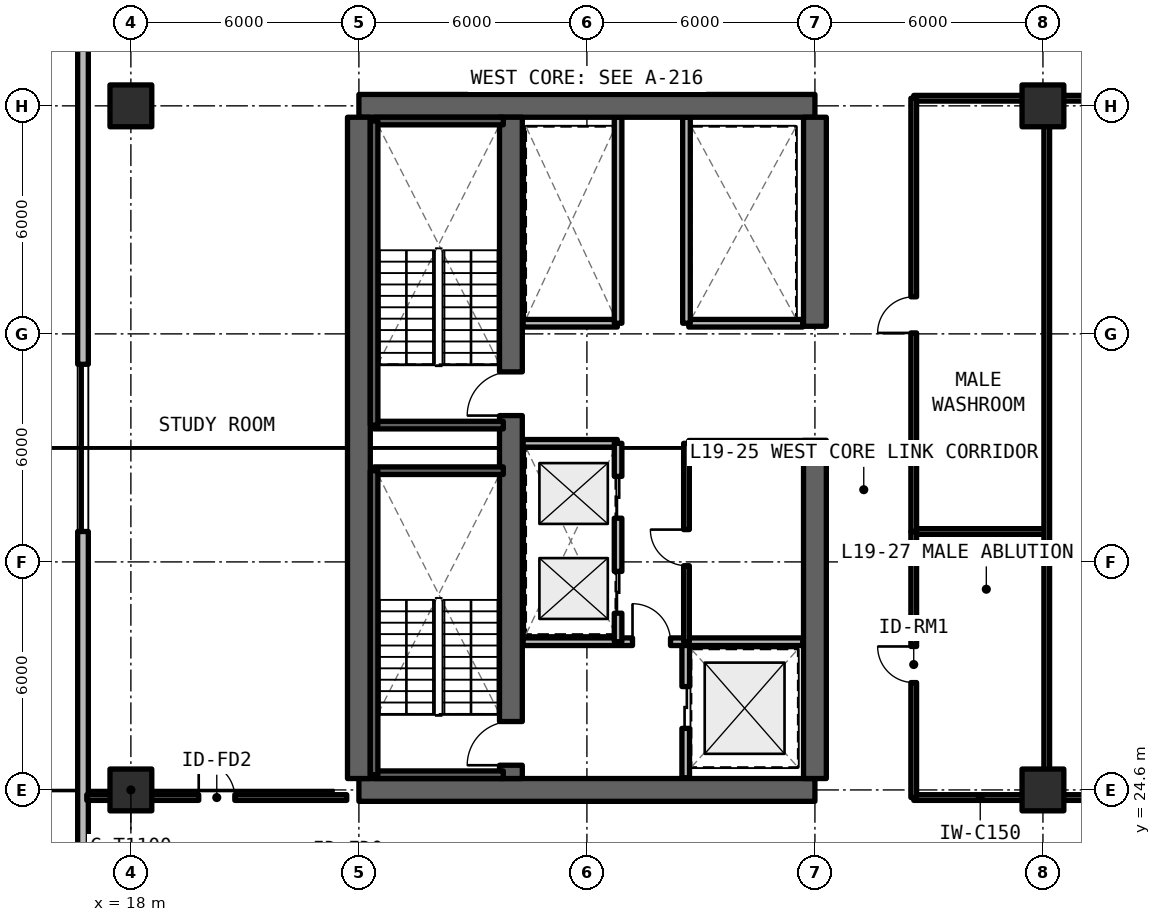
"""IFC4 building model, lengths in metres.
Left out: names, types, materials, properties, quantities, classifications, styles, units other than length and angle.
Written with IfcOpenShell. Run it as: python <this file> out.ifc"""

import sys

from ifc_helpers import new_model, si_unit, direction, frame, frame_2d, origin, origin_2d, place, context, subcontext, project, spatial, rectangle, extrude, element, fill, save


model = new_model("IFC4")
c1 = context("Model", 3, precision=1e-05, world=origin(), true_north=direction((0.0, 1.0)))
c2 = subcontext(c1, "Body", "Model", "MODEL_VIEW")
j1 = project(units=[si_unit("LENGTHUNIT", "METRE"), si_unit("PLANEANGLEUNIT", "RADIAN")], contexts=[c1])
p1 = place(None, origin())
s1 = spatial("IfcSite", under=j1, at=p1, CompositionType="ELEMENT")
p2 = place(p1, origin())
s2 = spatial("IfcBuilding", under=s1, at=p2, CompositionType="ELEMENT")
p3 = place(p2, frame((0.0, 0.0, 69.63)))
s3 = spatial("IfcBuildingStorey", under=s2, at=p3, CompositionType="ELEMENT", Elevation=69.63)
for number, where, z_axis, x_axis in (
    (1, (24.0, 24.6, 0.0), (0.0, 0.0, 1.0), (1.0, 0.0, 0.0)),
    (2, (36.0, 42.6, 0.0), (0.0, 0.0, 1.0), (-1.0, 0.0, 0.0)),
):
    element("IfcWall", number, at=place(p3, frame(where, z_axis=z_axis, x_axis=x_axis)), inside=s3, PredefinedType="SHEAR", context=c2, shape_type="SweptSolid", body=[
        extrude(rectangle(XDim=12.0, YDim=0.6, at=frame_2d((6.0, 0.0))), origin(), (0.0, 0.0, 1.0), 3.63),
    ])
p4 = place(p3, frame((24.0, 24.9, 0.0), z_axis=(0.0, 0.0, 1.0), x_axis=(0.0, 1.0, 0.0)))
e3 = element("IfcWall", 3, at=p4, inside=s3, PredefinedType="SHEAR", context=c2, shape_type="SweptSolid", body=[
    extrude(rectangle(XDim=17.4, YDim=0.6, at=frame_2d((8.7, 0.0))), origin(), (0.0, 0.0, 1.0), 3.63),
])
p5 = place(p3, frame((36.0, 24.9, 0.0), z_axis=(0.0, 0.0, 1.0), x_axis=(0.0, 1.0, 0.0)))
e4 = element("IfcWall", 4, at=p5, inside=s3, PredefinedType="SHEAR", context=c2, shape_type="SweptSolid", body=[
    extrude(rectangle(XDim=8.9, YDim=0.6, at=frame_2d((4.45, 0.0))), origin(), (0.0, 0.0, 1.0), 3.63),
])
p6 = place(p3, frame((36.0, 36.8, 0.0), z_axis=(0.0, 0.0, 1.0), x_axis=(0.0, 1.0, 0.0)))
e5 = element("IfcWall", 5, at=p6, inside=s3, PredefinedType="SHEAR", context=c2, shape_type="SweptSolid", body=[
    extrude(rectangle(XDim=5.5, YDim=0.6, at=frame_2d((2.75, 0.0))), origin(), (0.0, 0.0, 1.0), 3.63),
])
p7 = place(p3, frame((28.0, 24.9, 0.0), z_axis=(0.0, 0.0, 1.0), x_axis=(0.0, 1.0, 0.0)))
e6 = element("IfcWall", 6, at=p7, inside=s3, PredefinedType="SHEAR", context=c2, shape_type="SweptSolid", body=[
    extrude(rectangle(XDim=17.4, YDim=0.6, at=frame_2d((8.7, 0.0))), origin(), (0.0, 0.0, 1.0), 3.63),
])
p8 = place(p7, frame((0.35, 0.0, 0.0)))
e7 = element("IfcOpeningElement", 7, at=p8, cuts=e6, PredefinedType="OPENING", context=c2, shape_type="SweptSolid", body=[
    extrude(rectangle(XDim=1.15, YDim=2.15, at=frame_2d((0.575, 1.075))), frame((0.0, 0.31, 0.0), z_axis=(0.0, -1.0, 0.0), x_axis=(1.0, 0.0, 0.0)), (0.0, 0.0, 1.0), 0.62),
])
p9 = place(p7, frame((9.55, 0.0, 0.0)))
e8 = element("IfcOpeningElement", 8, at=p9, cuts=e6, PredefinedType="OPENING", context=c2, shape_type="SweptSolid", body=[
    extrude(rectangle(XDim=1.15, YDim=2.15, at=frame_2d((0.575, 1.075))), frame((0.0, 0.31, 0.0), z_axis=(0.0, -1.0, 0.0), x_axis=(1.0, 0.0, 0.0)), (0.0, 0.0, 1.0), 0.62),
])
for number, where, z_axis, x_axis in (
    (9, (18.0, 24.6, 0.0), (0.0, 0.0, 1.0), (1.0, 0.0, 0.0)),
    (10, (18.0, 42.6, 0.0), (0.0, 0.0, 1.0), (1.0, 0.0, 0.0)),
    (11, (42.0, 24.6, 0.0), (0.0, 0.0, 1.0), (1.0, 0.0, 0.0)),
    (12, (42.0, 42.6, 0.0), (0.0, 0.0, 1.0), (1.0, 0.0, 0.0)),
):
    element("IfcColumn", number, at=place(p3, frame(where, z_axis=z_axis, x_axis=x_axis)), inside=s3, PredefinedType="COLUMN", context=c2, shape_type="SweptSolid", body=[
        extrude(rectangle(XDim=1.1, YDim=1.1, at=origin_2d()), origin(), (0.0, 0.0, 1.0), 3.63),
    ])
p10 = place(p3, frame((16.74, 55.342, 0.0), z_axis=(0.0, 0.0, 1.0), x_axis=(0.0, -1.0, 0.0)))
e13 = element("IfcWall", 13, at=p10, inside=s3, PredefinedType="SOLIDWALL", context=c2, shape_type="SweptSolid", body=[
    extrude(rectangle(XDim=43.484, YDim=0.28, at=frame_2d((21.742, 0.0))), origin(), (0.0, 0.0, 1.0), 3.35),
])
p11 = place(p10, frame((19.542, 0.0, 0.78)))
e14 = element("IfcOpeningElement", 14, at=p11, cuts=e13, PredefinedType="OPENING", context=c2, shape_type="SweptSolid", body=[
    extrude(rectangle(XDim=4.4, YDim=1.66, at=frame_2d((2.2, 0.83))), frame((0.0, 0.15, 0.0), z_axis=(0.0, -1.0, 0.0), x_axis=(1.0, 0.0, 0.0)), (0.0, 0.0, 1.0), 0.3),
])
p12 = place(p10, frame((37.573, 0.0, 0.78)))
e15 = element("IfcOpeningElement", 15, at=p12, cuts=e13, PredefinedType="OPENING", context=c2, shape_type="SweptSolid", body=[
    extrude(rectangle(XDim=4.4, YDim=1.66, at=frame_2d((2.2, 0.83))), frame((0.0, 0.15, 0.0), z_axis=(0.0, -1.0, 0.0), x_axis=(1.0, 0.0, 0.0)), (0.0, 0.0, 1.0), 0.3),
])
p13 = place(p3, frame((32.6, 24.92, 0.0), z_axis=(0.0, 0.0, 1.0), x_axis=(0.0, 1.0, 0.0)))
e16 = element("IfcWall", 16, at=p13, inside=s3, PredefinedType="SOLIDWALL", context=c2, shape_type="SweptSolid", body=[
    extrude(rectangle(XDim=3.58, YDim=0.2, at=frame_2d((1.79, 0.0))), origin(), (0.0, 0.0, 1.0), 2.57),
])
p14 = place(p13, frame((1.3, 0.0, 0.0)))
e17 = element("IfcOpeningElement", 17, at=p14, cuts=e16, PredefinedType="OPENING", context=c2, shape_type="SweptSolid", body=[
    extrude(rectangle(XDim=1.1, YDim=2.2, at=frame_2d((0.55, 1.1))), frame((0.0, 0.11, 0.0), z_axis=(0.0, -1.0, 0.0), x_axis=(1.0, 0.0, 0.0)), (0.0, 0.0, 1.0), 0.22),
])
p15 = place(p3, frame((28.32, 28.5, 0.0), z_axis=(0.0, 0.0, 1.0), x_axis=(1.0, 0.0, 0.0)))
e18 = element("IfcWall", 18, at=p15, inside=s3, PredefinedType="SOLIDWALL", context=c2, shape_type="SweptSolid", body=[
    extrude(rectangle(XDim=7.36, YDim=0.2, at=frame_2d((3.68, 0.0))), origin(), (0.0, 0.0, 1.0), 2.57),
])
p16 = place(p15, frame((2.88, 0.0, 0.0)))
e19 = element("IfcOpeningElement", 19, at=p16, cuts=e18, PredefinedType="OPENING", context=c2, shape_type="SweptSolid", body=[
    extrude(rectangle(XDim=1.0, YDim=2.15, at=frame_2d((0.5, 1.075))), frame((0.0, 0.11, 0.0), z_axis=(0.0, -1.0, 0.0), x_axis=(1.0, 0.0, 0.0)), (0.0, 0.0, 1.0), 0.22),
])
p17 = place(p3, frame((28.32, 33.72, 0.0), z_axis=(0.0, 0.0, 1.0), x_axis=(1.0, 0.0, 0.0)))
e20 = element("IfcWall", 20, at=p17, inside=s3, PredefinedType="SOLIDWALL", context=c2, shape_type="SweptSolid", body=[
    extrude(rectangle(XDim=2.48, YDim=0.2, at=frame_2d((1.24, 0.0))), origin(), (0.0, 0.0, 1.0), 2.57),
])
p18 = place(p3, frame((30.82, 28.5, 0.0), z_axis=(0.0, 0.0, 1.0), x_axis=(0.0, 1.0, 0.0)))
e21 = element("IfcWall", 21, at=p18, inside=s3, PredefinedType="SOLIDWALL", context=c2, shape_type="SweptSolid", body=[
    extrude(rectangle(XDim=5.22, YDim=0.2, at=frame_2d((2.61, 0.0))), origin(), (0.0, 0.0, 1.0), 2.57),
])
p19 = place(p18, frame((0.75, 0.0, 0.0)))
e22 = element("IfcOpeningElement", 22, at=p19, cuts=e21, PredefinedType="OPENING", context=c2, shape_type="SweptSolid", body=[
    extrude(rectangle(XDim=1.1, YDim=2.2, at=frame_2d((0.55, 1.1))), frame((0.0, 0.11, 0.0), z_axis=(0.0, -1.0, 0.0), x_axis=(1.0, 0.0, 0.0)), (0.0, 0.0, 1.0), 0.22),
])
p20 = place(p18, frame((3.25, 0.0, 0.0)))
e23 = element("IfcOpeningElement", 23, at=p20, cuts=e21, PredefinedType="OPENING", context=c2, shape_type="SweptSolid", body=[
    extrude(rectangle(XDim=1.1, YDim=2.2, at=frame_2d((0.55, 1.1))), frame((0.0, 0.11, 0.0), z_axis=(0.0, -1.0, 0.0), x_axis=(1.0, 0.0, 0.0)), (0.0, 0.0, 1.0), 0.22),
])
p21 = place(p3, frame((32.68, 33.72, 0.0), z_axis=(0.0, 0.0, 1.0), x_axis=(1.0, 0.0, 0.0)))
e24 = element("IfcWall", 24, at=p21, inside=s3, PredefinedType="SOLIDWALL", context=c2, shape_type="SweptSolid", body=[
    extrude(rectangle(XDim=3.0, YDim=0.15, at=frame_2d((1.5, 0.0))), origin(), (0.0, 0.0, 1.0), 2.57),
])
p22 = place(p3, frame((32.62, 28.5, 0.0), z_axis=(0.0, 0.0, 1.0), x_axis=(0.0, 1.0, 0.0)))
e25 = element("IfcWall", 25, at=p22, inside=s3, PredefinedType="SOLIDWALL", context=c2, shape_type="SweptSolid", body=[
    extrude(rectangle(XDim=5.22, YDim=0.15, at=frame_2d((2.61, 0.0))), origin(), (0.0, 0.0, 1.0), 2.57),
])
p23 = place(p22, frame((2.0, 0.0, 0.0)))
e26 = element("IfcOpeningElement", 26, at=p23, cuts=e25, PredefinedType="OPENING", context=c2, shape_type="SweptSolid", body=[
    extrude(rectangle(XDim=0.95, YDim=2.15, at=frame_2d((0.475, 1.075))), frame((0.0, 0.085, 0.0), z_axis=(0.0, -1.0, 0.0), x_axis=(1.0, 0.0, 0.0)), (0.0, 0.0, 1.0), 0.17),
])
p24 = place(p3, frame((28.32, 36.88, 0.0), z_axis=(0.0, 0.0, 1.0), x_axis=(1.0, 0.0, 0.0)))
e27 = element("IfcWall", 27, at=p24, inside=s3, PredefinedType="SOLIDWALL", context=c2, shape_type="SweptSolid", body=[
    extrude(rectangle(XDim=2.48, YDim=0.2, at=frame_2d((1.24, 0.0))), origin(), (0.0, 0.0, 1.0), 2.57),
])
p25 = place(p3, frame((30.82, 36.88, 0.0), z_axis=(0.0, 0.0, 1.0), x_axis=(0.0, 1.0, 0.0)))
e28 = element("IfcWall", 28, at=p25, inside=s3, PredefinedType="SOLIDWALL", context=c2, shape_type="SweptSolid", body=[
    extrude(rectangle(XDim=5.42, YDim=0.2, at=frame_2d((2.71, 0.0))), origin(), (0.0, 0.0, 1.0), 2.57),
])
p26 = place(p3, frame((32.68, 36.88, 0.0), z_axis=(0.0, 0.0, 1.0), x_axis=(1.0, 0.0, 0.0)))
e29 = element("IfcWall", 29, at=p26, inside=s3, PredefinedType="SOLIDWALL", context=c2, shape_type="SweptSolid", body=[
    extrude(rectangle(XDim=3.0, YDim=0.2, at=frame_2d((1.5, 0.0))), origin(), (0.0, 0.0, 1.0), 2.57),
])
p27 = place(p3, frame((32.62, 36.88, 0.0), z_axis=(0.0, 0.0, 1.0), x_axis=(0.0, 1.0, 0.0)))
e30 = element("IfcWall", 30, at=p27, inside=s3, PredefinedType="SOLIDWALL", context=c2, shape_type="SweptSolid", body=[
    extrude(rectangle(XDim=5.42, YDim=0.2, at=frame_2d((2.71, 0.0))), origin(), (0.0, 0.0, 1.0), 2.57),
])
p28 = place(p3, frame((38.6, 24.4, 0.0), z_axis=(0.0, 0.0, 1.0), x_axis=(1.0, 0.0, 0.0)))
e31 = element("IfcWall", 31, at=p28, inside=s3, PredefinedType="SOLIDWALL", context=c2, shape_type="SweptSolid", body=[
    extrude(rectangle(XDim=3.5, YDim=0.15, at=frame_2d((1.75, 0.0))), origin(), (0.0, 0.0, 1.0), 2.565),
])
p29 = place(p3, frame((38.6, 31.4, 0.0), z_axis=(0.0, 0.0, 1.0), x_axis=(1.0, 0.0, 0.0)))
e32 = element("IfcWall", 32, at=p29, inside=s3, PredefinedType="SOLIDWALL", context=c2, shape_type="SweptSolid", body=[
    extrude(rectangle(XDim=3.5, YDim=0.15, at=frame_2d((1.75, 0.0))), origin(), (0.0, 0.0, 1.0), 2.57),
])
p30 = place(p3, frame((38.6, 24.4, 0.0), z_axis=(0.0, 0.0, 1.0), x_axis=(0.0, 1.0, 0.0)))
e33 = element("IfcWall", 33, at=p30, inside=s3, PredefinedType="SOLIDWALL", context=c2, shape_type="SweptSolid", body=[
    extrude(rectangle(XDim=7.0, YDim=0.15, at=frame_2d((3.5, 0.0))), origin(), (0.0, 0.0, 1.0), 2.57),
])
p31 = place(p30, frame((3.025, 0.0, 0.0)))
e34 = element("IfcOpeningElement", 34, at=p31, cuts=e33, PredefinedType="OPENING", context=c2, shape_type="SweptSolid", body=[
    extrude(rectangle(XDim=0.95, YDim=2.15, at=frame_2d((0.475, 1.075))), frame((0.0, 0.085, 0.0), z_axis=(0.0, -1.0, 0.0), x_axis=(1.0, 0.0, 0.0)), (0.0, 0.0, 1.0), 0.17),
])
p32 = place(p3, frame((38.6, 42.8, 0.0), z_axis=(0.0, 0.0, 1.0), x_axis=(1.0, 0.0, 0.0)))
e35 = element("IfcWall", 35, at=p32, inside=s3, PredefinedType="SOLIDWALL", context=c2, shape_type="SweptSolid", body=[
    extrude(rectangle(XDim=3.5, YDim=0.15, at=frame_2d((1.75, 0.0))), origin(), (0.0, 0.0, 1.0), 2.565),
])
p33 = place(p3, frame((38.6, 31.4, 0.0), z_axis=(0.0, 0.0, 1.0), x_axis=(0.0, 1.0, 0.0)))
e36 = element("IfcWall", 36, at=p33, inside=s3, PredefinedType="SOLIDWALL", context=c2, shape_type="SweptSolid", body=[
    extrude(rectangle(XDim=11.4, YDim=0.15, at=frame_2d((5.7, 0.0))), origin(), (0.0, 0.0, 1.0), 2.57),
])
p34 = place(p33, frame((5.225, 0.0, 0.0)))
e37 = element("IfcOpeningElement", 37, at=p34, cuts=e36, PredefinedType="OPENING", context=c2, shape_type="SweptSolid", body=[
    extrude(rectangle(XDim=0.95, YDim=2.15, at=frame_2d((0.475, 1.075))), frame((0.0, 0.085, 0.0), z_axis=(0.0, -1.0, 0.0), x_axis=(1.0, 0.0, 0.0)), (0.0, 0.0, 1.0), 0.17),
])
p35 = place(p3, frame((42.1, 24.4, 0.0), z_axis=(0.0, 0.0, 1.0), x_axis=(1.0, 0.0, 0.0)))
e38 = element("IfcWall", 38, at=p35, inside=s3, PredefinedType="SOLIDWALL", context=c2, shape_type="SweptSolid", body=[
    extrude(rectangle(XDim=29.0, YDim=0.15, at=frame_2d((14.5, 0.0))), origin(), (0.0, 0.0, 1.0), 2.565),
])
p36 = place(p35, frame((13.8, 0.0, 0.0)))
e39 = element("IfcOpeningElement", 39, at=p36, cuts=e38, PredefinedType="OPENING", context=c2, shape_type="SweptSolid", body=[
    extrude(rectangle(XDim=1.4, YDim=2.15, at=frame_2d((0.7, 1.075))), frame((0.0, 0.085, 0.0), z_axis=(0.0, -1.0, 0.0), x_axis=(1.0, 0.0, 0.0)), (0.0, 0.0, 1.0), 0.17),
])
p37 = place(p3, frame((42.1, 42.8, 0.0), z_axis=(0.0, 0.0, 1.0), x_axis=(1.0, 0.0, 0.0)))
e40 = element("IfcWall", 40, at=p37, inside=s3, PredefinedType="SOLIDWALL", context=c2, shape_type="SweptSolid", body=[
    extrude(rectangle(XDim=29.0, YDim=0.15, at=frame_2d((14.5, 0.0))), origin(), (0.0, 0.0, 1.0), 2.565),
])
p38 = place(p3, frame((42.1, 24.4, 0.0), z_axis=(0.0, 0.0, 1.0), x_axis=(0.0, 1.0, 0.0)))
e41 = element("IfcWall", 41, at=p38, inside=s3, PredefinedType="SOLIDWALL", context=c2, shape_type="SweptSolid", body=[
    extrude(rectangle(XDim=18.4, YDim=0.15, at=frame_2d((9.2, 0.0))), origin(), (0.0, 0.0, 1.0), 2.57),
])
p39 = place(p3, frame((16.84, 24.4, 0.0), z_axis=(0.0, 0.0, 1.0), x_axis=(1.0, 0.0, 0.0)))
e42 = element("IfcWall", 42, at=p39, inside=s3, PredefinedType="SOLIDWALL", context=c2, shape_type="SweptSolid", body=[
    extrude(rectangle(XDim=6.84, YDim=0.15, at=frame_2d((3.42, 0.0))), origin(), (0.0, 0.0, 1.0), 2.565),
])
p40 = place(p39, frame((2.945, 0.0, 0.0)))
e43 = element("IfcOpeningElement", 43, at=p40, cuts=e42, PredefinedType="OPENING", context=c2, shape_type="SweptSolid", body=[
    extrude(rectangle(XDim=0.95, YDim=2.15, at=frame_2d((0.475, 1.075))), frame((0.0, 0.085, 0.0), z_axis=(0.0, -1.0, 0.0), x_axis=(1.0, 0.0, 0.0)), (0.0, 0.0, 1.0), 0.17),
])
for number, where, z_axis, x_axis in (
    (44, (24.4, 25.0, 0.0), (0.0, 0.0, 1.0), (1.0, 0.0, 0.0)),
    (45, (27.8, 33.0, 0.0), (0.0, 0.0, 1.0), (-1.0, 0.0, 0.0)),
):
    element("IfcWall", number, at=place(p3, frame(where, z_axis=z_axis, x_axis=x_axis)), inside=s3, PredefinedType="SOLIDWALL", context=c2, shape_type="SweptSolid", body=[
        extrude(rectangle(XDim=3.4, YDim=0.2, at=frame_2d((1.7, 0.0))), origin(), (0.0, 0.0, 1.0), 3.63),
    ])
p41 = place(p3, frame((24.4, 33.0, 0.0), z_axis=(0.0, 0.0, 1.0), x_axis=(0.0, -1.0, 0.0)))
e46 = element("IfcWall", 46, at=p41, inside=s3, PredefinedType="SOLIDWALL", context=c2, shape_type="SweptSolid", body=[
    extrude(rectangle(XDim=8.0, YDim=0.2, at=frame_2d((4.0, 0.0))), origin(), (0.0, 0.0, 1.0), 3.63),
])
for number, where, z_axis, x_axis in (
    (47, (24.4, 34.2, 0.0), (0.0, 0.0, 1.0), (1.0, 0.0, 0.0)),
    (48, (27.8, 42.2, 0.0), (0.0, 0.0, 1.0), (-1.0, 0.0, 0.0)),
):
    element("IfcWall", number, at=place(p3, frame(where, z_axis=z_axis, x_axis=x_axis)), inside=s3, PredefinedType="SOLIDWALL", context=c2, shape_type="SweptSolid", body=[
        extrude(rectangle(XDim=3.4, YDim=0.2, at=frame_2d((1.7, 0.0))), origin(), (0.0, 0.0, 1.0), 3.63),
    ])
p42 = place(p3, frame((24.4, 42.2, 0.0), z_axis=(0.0, 0.0, 1.0), x_axis=(0.0, -1.0, 0.0)))
e49 = element("IfcWall", 49, at=p42, inside=s3, PredefinedType="SOLIDWALL", context=c2, shape_type="SweptSolid", body=[
    extrude(rectangle(XDim=8.0, YDim=0.2, at=frame_2d((4.0, 0.0))), origin(), (0.0, 0.0, 1.0), 3.63),
])
p43 = place(p11, origin())
e50 = element("IfcWindow", 50, at=p43, inside=s3, PartitioningType="SINGLE_PANEL", PredefinedType="WINDOW", context=c2, shape_type="SweptSolid", body=[
    extrude(rectangle(XDim=4.4, YDim=1.66, at=frame_2d((2.2, 0.83))), frame((0.0, 0.03, 0.0), z_axis=(0.0, -1.0, 0.0), x_axis=(1.0, 0.0, 0.0)), (0.0, 0.0, 1.0), 0.06),
])
fill(e14, e50)
p44 = place(p14, origin())
e51 = element("IfcDoor", 51, at=p44, inside=s3, OperationType="SLIDING_TO_LEFT", PredefinedType="DOOR", context=c2, shape_type="SweptSolid", body=[
    extrude(rectangle(XDim=1.1, YDim=2.2, at=frame_2d((0.55, 1.1))), frame((0.0, 0.025, 0.0), z_axis=(0.0, -1.0, 0.0), x_axis=(1.0, 0.0, 0.0)), (0.0, 0.0, 1.0), 0.05),
])
fill(e17, e51)
p45 = place(p16, origin())
e52 = element("IfcDoor", 52, at=p45, inside=s3, OperationType="SINGLE_SWING_LEFT", PredefinedType="DOOR", context=c2, shape_type="SweptSolid", body=[
    extrude(rectangle(XDim=1.0, YDim=2.15, at=frame_2d((0.5, 1.075))), frame((0.0, 0.025, 0.0), z_axis=(0.0, -1.0, 0.0), x_axis=(1.0, 0.0, 0.0)), (0.0, 0.0, 1.0), 0.05),
])
fill(e19, e52)
p46 = place(p19, origin())
e53 = element("IfcDoor", 53, at=p46, inside=s3, OperationType="SLIDING_TO_LEFT", PredefinedType="DOOR", context=c2, shape_type="SweptSolid", body=[
    extrude(rectangle(XDim=1.1, YDim=2.2, at=frame_2d((0.55, 1.1))), frame((0.0, 0.025, 0.0), z_axis=(0.0, -1.0, 0.0), x_axis=(1.0, 0.0, 0.0)), (0.0, 0.0, 1.0), 0.05),
])
fill(e22, e53)
p47 = place(p20, origin())
e54 = element("IfcDoor", 54, at=p47, inside=s3, OperationType="SLIDING_TO_RIGHT", PredefinedType="DOOR", context=c2, shape_type="SweptSolid", body=[
    extrude(rectangle(XDim=1.1, YDim=2.2, at=frame_2d((0.55, 1.1))), frame((0.0, 0.025, 0.0), z_axis=(0.0, -1.0, 0.0), x_axis=(1.0, 0.0, 0.0)), (0.0, 0.0, 1.0), 0.05),
])
fill(e23, e54)
p48 = place(p23, origin())
e55 = element("IfcDoor", 55, at=p48, inside=s3, OperationType="SINGLE_SWING_RIGHT", PredefinedType="DOOR", context=c2, shape_type="SweptSolid", body=[
    extrude(rectangle(XDim=0.95, YDim=2.15, at=frame_2d((0.475, 1.075))), frame((0.0, 0.025, 0.0), z_axis=(0.0, -1.0, 0.0), x_axis=(1.0, 0.0, 0.0)), (0.0, 0.0, 1.0), 0.05),
])
fill(e26, e55)
p49 = place(p31, origin())
e56 = element("IfcDoor", 56, at=p49, inside=s3, OperationType="SINGLE_SWING_RIGHT", PredefinedType="DOOR", context=c2, shape_type="SweptSolid", body=[
    extrude(rectangle(XDim=0.95, YDim=2.15, at=frame_2d((0.475, 1.075))), frame((0.0, 0.025, 0.0), z_axis=(0.0, -1.0, 0.0), x_axis=(1.0, 0.0, 0.0)), (0.0, 0.0, 1.0), 0.05),
])
fill(e34, e56)
p50 = place(p34, origin())
e57 = element("IfcDoor", 57, at=p50, inside=s3, OperationType="SINGLE_SWING_LEFT", PredefinedType="DOOR", context=c2, shape_type="SweptSolid", body=[
    extrude(rectangle(XDim=0.95, YDim=2.15, at=frame_2d((0.475, 1.075))), frame((0.0, 0.025, 0.0), z_axis=(0.0, -1.0, 0.0), x_axis=(1.0, 0.0, 0.0)), (0.0, 0.0, 1.0), 0.05),
])
fill(e37, e57)
p51 = place(p40, origin())
e58 = element("IfcDoor", 58, at=p51, inside=s3, OperationType="SINGLE_SWING_LEFT", PredefinedType="DOOR", context=c2, shape_type="SweptSolid", body=[
    extrude(rectangle(XDim=0.95, YDim=2.15, at=frame_2d((0.475, 1.075))), frame((0.0, 0.025, 0.0), z_axis=(0.0, -1.0, 0.0), x_axis=(1.0, 0.0, 0.0)), (0.0, 0.0, 1.0), 0.05),
])
fill(e43, e58)
p52 = place(p8, origin())
e59 = element("IfcDoor", 59, at=p52, inside=s3, OperationType="SINGLE_SWING_RIGHT", PredefinedType="DOOR", context=c2, shape_type="SweptSolid", body=[
    extrude(rectangle(XDim=1.15, YDim=2.15, at=frame_2d((0.575, 1.075))), frame((0.0, 0.025, 0.0), z_axis=(0.0, -1.0, 0.0), x_axis=(1.0, 0.0, 0.0)), (0.0, 0.0, 1.0), 0.05),
])
fill(e7, e59)
p53 = place(p9, origin())
e60 = element("IfcDoor", 60, at=p53, inside=s3, OperationType="SINGLE_SWING_LEFT", PredefinedType="DOOR", context=c2, shape_type="SweptSolid", body=[
    extrude(rectangle(XDim=1.15, YDim=2.15, at=frame_2d((0.575, 1.075))), frame((0.0, 0.025, 0.0), z_axis=(0.0, -1.0, 0.0), x_axis=(1.0, 0.0, 0.0)), (0.0, 0.0, 1.0), 0.05),
])
fill(e8, e60)
save(model, sys.argv[1])
